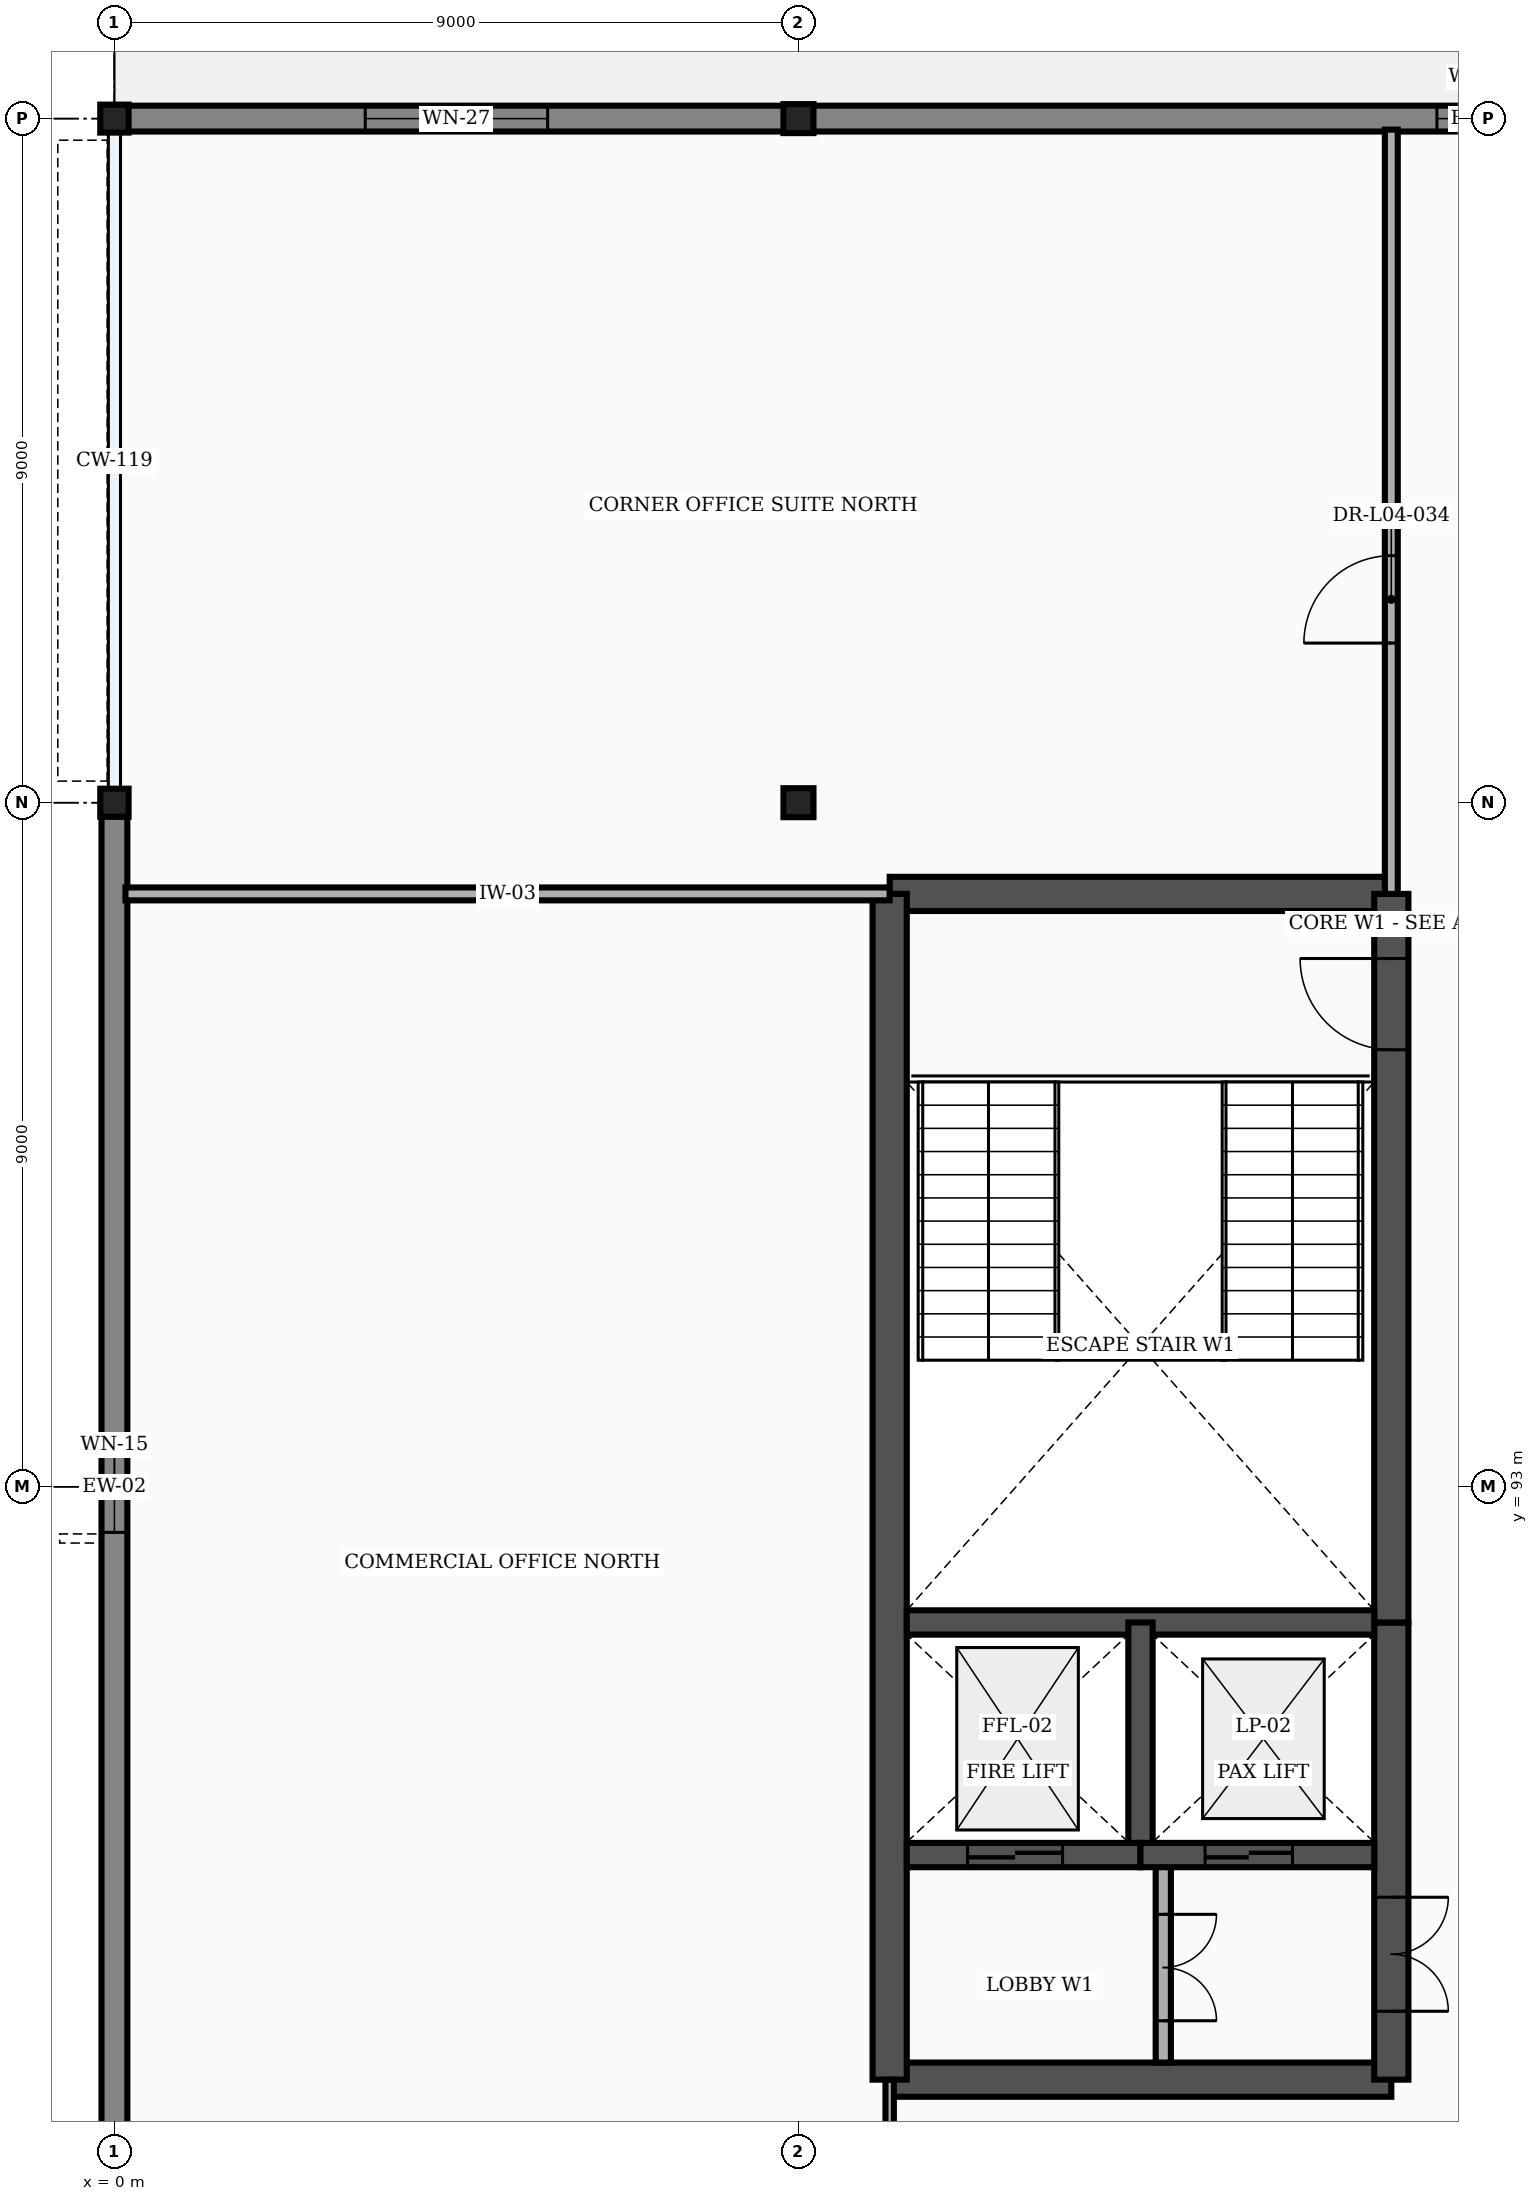
"""IFC4 building model, lengths in metres.
Left out: names, types, materials, properties, quantities, classifications, styles, units other than length and angle.
Written with IfcOpenShell. Run it as: python <this file> out.ifc"""

import sys

from ifc_helpers import new_model, si_unit, direction, frame, frame_2d, origin, origin_2d, place, context, subcontext, project, spatial, rectangle, i_section, extrude, element, fill, save


model = new_model("IFC4")
c1 = context("Model", 3, precision=1e-05, world=origin(), true_north=direction((0.0, 1.0)))
c2 = subcontext(c1, "Body", "Model", "MODEL_VIEW")
j1 = project(units=[si_unit("LENGTHUNIT", "METRE"), si_unit("PLANEANGLEUNIT", "RADIAN")], contexts=[c1])
p1 = place(None, origin())
s1 = spatial("IfcSite", under=j1, at=p1, CompositionType="ELEMENT")
p2 = place(p1, origin())
s2 = spatial("IfcBuilding", under=s1, at=p2, CompositionType="ELEMENT")
p3 = place(p2, frame((0.0, 0.0, 21.6)))
s3 = spatial("IfcBuildingStorey", under=s2, at=p3, CompositionType="ELEMENT", Elevation=21.6)
for number, where, z_axis, x_axis in (
    (1, (0.0, 102.0, 0.0), (0.0, 0.0, 1.0), (1.0, 0.0, 0.0)),
    (2, (0.0, 111.0, 0.0), (0.0, 0.0, 1.0), (1.0, 0.0, 0.0)),
):
    element("IfcColumn", number, at=place(p3, frame(where, z_axis=z_axis, x_axis=x_axis)), inside=s3, PredefinedType="COLUMN", context=c2, shape_type="SweptSolid", body=[
        extrude(i_section(OverallWidth=0.373, OverallDepth=0.368, WebThickness=0.014, FlangeThickness=0.024, FilletRadius=0.015, at=origin_2d()), origin(), (0.0, 0.0, 1.0), 3.9),
    ])
for number, where, z_axis, x_axis in (
    (3, (9.0, 102.0, 0.0), (0.0, 0.0, 1.0), (1.0, 0.0, 0.0)),
    (4, (9.0, 111.0, 0.0), (0.0, 0.0, 1.0), (1.0, 0.0, 0.0)),
):
    element("IfcColumn", number, at=place(p3, frame(where, z_axis=z_axis, x_axis=x_axis)), inside=s3, PredefinedType="COLUMN", context=c2, shape_type="SweptSolid", body=[
        extrude(i_section(OverallWidth=0.395, OverallDepth=0.381, WebThickness=0.018, FlangeThickness=0.03, at=origin_2d()), origin(), (0.0, 0.0, 1.0), 3.9),
    ])
p4 = place(p3, frame((0.01, 111.0, 0.0), z_axis=(0.0, 0.0, 1.0), x_axis=(1.0, 0.0, 0.0)))
e5 = element("IfcWall", 5, at=p4, inside=s3, PredefinedType="STANDARD", context=c2, shape_type="SweptSolid", body=[
    extrude(rectangle(XDim=8.98, YDim=0.34, at=frame_2d((4.49, 0.0))), origin(), (0.0, 0.0, 1.0), 3.585),
])
p5 = place(p4, frame((3.29, 0.0, 0.7)))
e6 = element("IfcOpeningElement", 6, at=p5, cuts=e5, PredefinedType="OPENING", context=c2, shape_type="SweptSolid", body=[
    extrude(rectangle(XDim=2.4, YDim=1.95, at=frame_2d((1.2, 0.975))), frame((0.0, 0.182, 0.0), z_axis=(0.0, -1.0, 0.0), x_axis=(1.0, 0.0, 0.0)), (0.0, 0.0, 1.0), 0.364),
])
p6 = place(p3, frame((9.01, 111.0, 0.0), z_axis=(0.0, 0.0, 1.0), x_axis=(1.0, 0.0, 0.0)))
e7 = element("IfcWall", 7, at=p6, inside=s3, PredefinedType="STANDARD", context=c2, shape_type="SweptSolid", body=[
    extrude(rectangle(XDim=17.98, YDim=0.34, at=frame_2d((8.99, 0.0))), origin(), (0.0, 0.0, 1.0), 3.245),
])
p7 = place(p6, frame((8.39, 0.0, 0.7)))
e8 = element("IfcOpeningElement", 8, at=p7, cuts=e7, PredefinedType="OPENING", context=c2, shape_type="SweptSolid", body=[
    extrude(rectangle(XDim=1.2, YDim=1.95, at=frame_2d((0.6, 0.975))), frame((0.0, 0.182, 0.0), z_axis=(0.0, -1.0, 0.0), x_axis=(1.0, 0.0, 0.0)), (0.0, 0.0, 1.0), 0.364),
])
p8 = place(p3, frame((0.0, 84.182, 0.0), z_axis=(0.0, 0.0, 1.0), x_axis=(0.0, 1.0, 0.0)))
e9 = element("IfcWall", 9, at=p8, inside=s3, PredefinedType="STANDARD", context=c2, shape_type="SweptSolid", body=[
    extrude(rectangle(XDim=17.636, YDim=0.34, at=frame_2d((8.818, 0.0))), origin(), (0.0, 0.0, 1.0), 2.973),
])
p9 = place(p8, frame((8.218, 0.0, 0.7)))
e10 = element("IfcOpeningElement", 10, at=p9, cuts=e9, PredefinedType="OPENING", context=c2, shape_type="SweptSolid", body=[
    extrude(rectangle(XDim=1.2, YDim=1.95, at=frame_2d((0.6, 0.975))), frame((0.0, 0.182, 0.0), z_axis=(0.0, -1.0, 0.0), x_axis=(1.0, 0.0, 0.0)), (0.0, 0.0, 1.0), 0.364),
])
for number, where, z_axis, x_axis in (
    (11, (10.2, 85.2, 0.0), (0.0, 0.0, 1.0), (1.0, 0.0, 0.0)),
    (12, (10.2, 100.8, 0.0), (0.0, 0.0, 1.0), (1.0, 0.0, 0.0)),
):
    element("IfcWall", number, at=place(p3, frame(where, z_axis=z_axis, x_axis=x_axis)), inside=s3, PredefinedType="SHEAR", context=c2, shape_type="SweptSolid", body=[
        extrude(rectangle(XDim=6.6, YDim=0.45, at=frame_2d((3.3, 0.0))), origin(), (0.0, 0.0, 1.0), 3.585),
    ])
p10 = place(p3, frame((10.2, 85.2, 0.0), z_axis=(0.0, 0.0, 1.0), x_axis=(0.0, 1.0, 0.0)))
e13 = element("IfcWall", 13, at=p10, inside=s3, PredefinedType="SHEAR", context=c2, shape_type="SweptSolid", body=[
    extrude(rectangle(XDim=15.6, YDim=0.45, at=frame_2d((7.8, 0.0))), origin(), (0.0, 0.0, 1.0), 3.585),
])
p11 = place(p3, frame((16.8, 85.2, 0.0), z_axis=(0.0, 0.0, 1.0), x_axis=(0.0, 1.0, 0.0)))
e14 = element("IfcWall", 14, at=p11, inside=s3, PredefinedType="SHEAR", context=c2, shape_type="SweptSolid", body=[
    extrude(rectangle(XDim=6.015, YDim=0.45, at=frame_2d((3.008, 0.0))), origin(), (0.0, 0.0, 1.0), 3.585),
])
p12 = place(p11, frame((0.9, 0.0, 0.0)))
e15 = element("IfcOpeningElement", 15, at=p12, cuts=e14, PredefinedType="OPENING", context=c2, shape_type="SweptSolid", body=[
    extrude(rectangle(XDim=1.5, YDim=2.2, at=frame_2d((0.75, 1.1))), frame((0.0, 0.237, 0.0), z_axis=(0.0, -1.0, 0.0), x_axis=(1.0, 0.0, 0.0)), (0.0, 0.0, 1.0), 0.474),
])
p13 = place(p3, frame((16.8, 91.215, 0.0), z_axis=(0.0, 0.0, 1.0), x_axis=(0.0, 1.0, 0.0)))
e16 = element("IfcWall", 16, at=p13, inside=s3, PredefinedType="SHEAR", context=c2, shape_type="SweptSolid", body=[
    extrude(rectangle(XDim=9.585, YDim=0.45, at=frame_2d((4.792, 0.0))), origin(), (0.0, 0.0, 1.0), 3.585),
])
p14 = place(p13, frame((7.535, 0.0, 0.0)))
e17 = element("IfcOpeningElement", 17, at=p14, cuts=e16, PredefinedType="OPENING", context=c2, shape_type="SweptSolid", body=[
    extrude(rectangle(XDim=1.2, YDim=2.2, at=frame_2d((0.6, 1.1))), frame((0.0, 0.237, 0.0), z_axis=(0.0, -1.0, 0.0), x_axis=(1.0, 0.0, 0.0)), (0.0, 0.0, 1.0), 0.474),
])
p15 = place(p3, frame((10.425, 91.215, 0.0), z_axis=(0.0, 0.0, 1.0), x_axis=(1.0, 0.0, 0.0)))
e18 = element("IfcWall", 18, at=p15, inside=s3, PredefinedType="SHEAR", context=c2, shape_type="SweptSolid", body=[
    extrude(rectangle(XDim=6.15, YDim=0.32, at=frame_2d((3.075, 0.0))), origin(), (0.0, 0.0, 1.0), 3.585),
])
p16 = place(p3, frame((13.5, 88.155, 0.0), z_axis=(0.0, 0.0, 1.0), x_axis=(0.0, 1.0, 0.0)))
e19 = element("IfcWall", 19, at=p16, inside=s3, PredefinedType="SHEAR", context=c2, shape_type="SweptSolid", body=[
    extrude(rectangle(XDim=3.06, YDim=0.32, at=frame_2d((1.53, 0.0))), origin(), (0.0, 0.0, 1.0), 3.585),
])
p17 = place(p3, frame((13.8, 85.425, 0.0), z_axis=(0.0, 0.0, 1.0), x_axis=(0.0, 1.0, 0.0)))
e20 = element("IfcWall", 20, at=p17, inside=s3, PredefinedType="PARTITIONING", context=c2, shape_type="SweptSolid", body=[
    extrude(rectangle(XDim=2.73, YDim=0.2, at=frame_2d((1.365, 0.0))), origin(), (0.0, 0.0, 1.0), 3.585),
])
p18 = place(p17, frame((0.55, 0.0, 0.0)))
e21 = element("IfcOpeningElement", 21, at=p18, cuts=e20, PredefinedType="OPENING", context=c2, shape_type="SweptSolid", body=[
    extrude(rectangle(XDim=1.4, YDim=2.25, at=frame_2d((0.7, 1.125))), frame((0.0, 0.112, 0.0), z_axis=(0.0, -1.0, 0.0), x_axis=(1.0, 0.0, 0.0)), (0.0, 0.0, 1.0), 0.224),
])
p19 = place(p3, frame((10.425, 88.155, 0.0), z_axis=(0.0, 0.0, 1.0), x_axis=(1.0, 0.0, 0.0)))
e22 = element("IfcWall", 22, at=p19, inside=s3, PredefinedType="SHEAR", context=c2, shape_type="SweptSolid", body=[
    extrude(rectangle(XDim=3.075, YDim=0.32, at=frame_2d((1.538, 0.0))), origin(), (0.0, 0.0, 1.0), 3.585),
])
p20 = place(p19, frame((0.8, 0.0, 0.0)))
e23 = element("IfcOpeningElement", 23, at=p20, cuts=e22, PredefinedType="OPENING", context=c2, shape_type="SweptSolid", body=[
    extrude(rectangle(XDim=1.25, YDim=2.25, at=frame_2d((0.625, 1.125))), frame((0.0, 0.172, 0.0), z_axis=(0.0, -1.0, 0.0), x_axis=(1.0, 0.0, 0.0)), (0.0, 0.0, 1.0), 0.344),
])
p21 = place(p3, frame((13.5, 88.155, 0.0), z_axis=(0.0, 0.0, 1.0), x_axis=(1.0, 0.0, 0.0)))
e24 = element("IfcWall", 24, at=p21, inside=s3, PredefinedType="SHEAR", context=c2, shape_type="SweptSolid", body=[
    extrude(rectangle(XDim=3.075, YDim=0.32, at=frame_2d((1.538, 0.0))), origin(), (0.0, 0.0, 1.0), 3.585),
])
p22 = place(p21, frame((0.85, 0.0, 0.0)))
e25 = element("IfcOpeningElement", 25, at=p22, cuts=e24, PredefinedType="OPENING", context=c2, shape_type="SweptSolid", body=[
    extrude(rectangle(XDim=1.15, YDim=2.2, at=frame_2d((0.575, 1.1))), frame((0.0, 0.172, 0.0), z_axis=(0.0, -1.0, 0.0), x_axis=(1.0, 0.0, 0.0)), (0.0, 0.0, 1.0), 0.344),
])
p23 = place(p3, frame((10.2, 83.2, 0.0), z_axis=(0.0, 0.0, 1.0), x_axis=(0.0, 1.0, 0.0)))
e26 = element("IfcWall", 26, at=p23, inside=s3, PredefinedType="PARTITIONING", context=c2, shape_type="SweptSolid", body=[
    extrude(rectangle(XDim=2.0, YDim=0.11, at=frame_2d((1.0, 0.0))), origin(), (0.0, 0.0, 1.0), 3.585),
])
p24 = place(p3, frame((0.145, 100.8, 0.0), z_axis=(0.0, 0.0, 1.0), x_axis=(1.0, 0.0, 0.0)))
e27 = element("IfcWall", 27, at=p24, inside=s3, PredefinedType="PARTITIONING", context=c2, shape_type="SweptSolid", body=[
    extrude(rectangle(XDim=10.055, YDim=0.17, at=frame_2d((5.027, 0.0))), origin(), (0.0, 0.0, 1.0), 3.585),
])
p25 = place(p3, frame((16.8, 100.8, 0.0), z_axis=(0.0, 0.0, 1.0), x_axis=(0.0, 1.0, 0.0)))
e28 = element("IfcWall", 28, at=p25, inside=s3, PredefinedType="PARTITIONING", context=c2, shape_type="SweptSolid", body=[
    extrude(rectangle(XDim=10.055, YDim=0.17, at=frame_2d((5.027, 0.0))), origin(), (0.0, 0.0, 1.0), 3.585),
])
p26 = place(p25, frame((3.3, 0.0, 0.0)))
e29 = element("IfcOpeningElement", 29, at=p26, cuts=e28, PredefinedType="OPENING", context=c2, shape_type="SweptSolid", body=[
    extrude(rectangle(XDim=1.15, YDim=2.15, at=frame_2d((0.575, 1.075))), frame((0.0, 0.097, 0.0), z_axis=(0.0, -1.0, 0.0), x_axis=(1.0, 0.0, 0.0)), (0.0, 0.0, 1.0), 0.194),
])
p27 = place(p5, origin())
e30 = element("IfcWindow", 30, at=p27, inside=s3, PartitioningType="SINGLE_PANEL", PredefinedType="WINDOW", context=c2, shape_type="SweptSolid", body=[
    extrude(rectangle(XDim=2.4, YDim=1.95, at=frame_2d((1.2, 0.975))), frame((0.0, 0.03, 0.0), z_axis=(0.0, -1.0, 0.0), x_axis=(1.0, 0.0, 0.0)), (0.0, 0.0, 1.0), 0.06),
])
fill(e6, e30)
p28 = place(p7, origin())
e31 = element("IfcWindow", 31, at=p28, inside=s3, PartitioningType="SINGLE_PANEL", PredefinedType="WINDOW", context=c2, shape_type="SweptSolid", body=[
    extrude(rectangle(XDim=1.2, YDim=1.95, at=frame_2d((0.6, 0.975))), frame((0.0, 0.03, 0.0), z_axis=(0.0, -1.0, 0.0), x_axis=(1.0, 0.0, 0.0)), (0.0, 0.0, 1.0), 0.06),
])
fill(e8, e31)
p29 = place(p9, origin())
e32 = element("IfcWindow", 32, at=p29, inside=s3, PartitioningType="SINGLE_PANEL", PredefinedType="WINDOW", context=c2, shape_type="SweptSolid", body=[
    extrude(rectangle(XDim=1.2, YDim=1.95, at=frame_2d((0.6, 0.975))), frame((0.0, 0.03, 0.0), z_axis=(0.0, -1.0, 0.0), x_axis=(1.0, 0.0, 0.0)), (0.0, 0.0, 1.0), 0.06),
])
fill(e10, e32)
p30 = place(p12, frame((1.5, 0.0, 0.0), z_axis=(0.0, 0.0, 1.0), x_axis=(-1.0, 0.0, 0.0)))
e33 = element("IfcDoor", 33, at=p30, inside=s3, OperationType="DOUBLE_DOOR_SINGLE_SWING", PredefinedType="DOOR", context=c2, shape_type="SweptSolid", body=[
    extrude(rectangle(XDim=1.5, YDim=2.2, at=frame_2d((0.75, 1.1))), frame((0.0, 0.025, 0.0), z_axis=(0.0, -1.0, 0.0), x_axis=(1.0, 0.0, 0.0)), (0.0, 0.0, 1.0), 0.05),
])
fill(e15, e33)
p31 = place(p14, origin())
e34 = element("IfcDoor", 34, at=p31, inside=s3, OperationType="SINGLE_SWING_RIGHT", PredefinedType="DOOR", context=c2, shape_type="SweptSolid", body=[
    extrude(rectangle(XDim=1.2, YDim=2.2, at=frame_2d((0.6, 1.1))), frame((0.0, 0.025, 0.0), z_axis=(0.0, -1.0, 0.0), x_axis=(1.0, 0.0, 0.0)), (0.0, 0.0, 1.0), 0.05),
])
fill(e17, e34)
p32 = place(p18, frame((1.4, 0.0, 0.0), z_axis=(0.0, 0.0, 1.0), x_axis=(-1.0, 0.0, 0.0)))
e35 = element("IfcDoor", 35, at=p32, inside=s3, OperationType="DOUBLE_DOOR_SINGLE_SWING", PredefinedType="DOOR", context=c2, shape_type="SweptSolid", body=[
    extrude(rectangle(XDim=1.4, YDim=2.25, at=frame_2d((0.7, 1.125))), frame((0.0, 0.025, 0.0), z_axis=(0.0, -1.0, 0.0), x_axis=(1.0, 0.0, 0.0)), (0.0, 0.0, 1.0), 0.05),
])
fill(e21, e35)
p33 = place(p20, origin())
e36 = element("IfcDoor", 36, at=p33, inside=s3, OperationType="DOUBLE_DOOR_SLIDING", PredefinedType="DOOR", context=c2, shape_type="SweptSolid", body=[
    extrude(rectangle(XDim=1.25, YDim=2.25, at=frame_2d((0.625, 1.125))), frame((0.0, 0.025, 0.0), z_axis=(0.0, -1.0, 0.0), x_axis=(1.0, 0.0, 0.0)), (0.0, 0.0, 1.0), 0.05),
])
fill(e23, e36)
p34 = place(p22, origin())
e37 = element("IfcDoor", 37, at=p34, inside=s3, OperationType="DOUBLE_DOOR_SLIDING", PredefinedType="DOOR", context=c2, shape_type="SweptSolid", body=[
    extrude(rectangle(XDim=1.15, YDim=2.2, at=frame_2d((0.575, 1.1))), frame((0.0, 0.025, 0.0), z_axis=(0.0, -1.0, 0.0), x_axis=(1.0, 0.0, 0.0)), (0.0, 0.0, 1.0), 0.05),
])
fill(e25, e37)
p35 = place(p26, origin())
e38 = element("IfcDoor", 38, at=p35, inside=s3, OperationType="SINGLE_SWING_LEFT", PredefinedType="DOOR", context=c2, shape_type="SweptSolid", body=[
    extrude(rectangle(XDim=1.15, YDim=2.15, at=frame_2d((0.575, 1.075))), frame((0.0, 0.025, 0.0), z_axis=(0.0, -1.0, 0.0), x_axis=(1.0, 0.0, 0.0)), (0.0, 0.0, 1.0), 0.05),
])
fill(e29, e38)
save(model, sys.argv[1])
